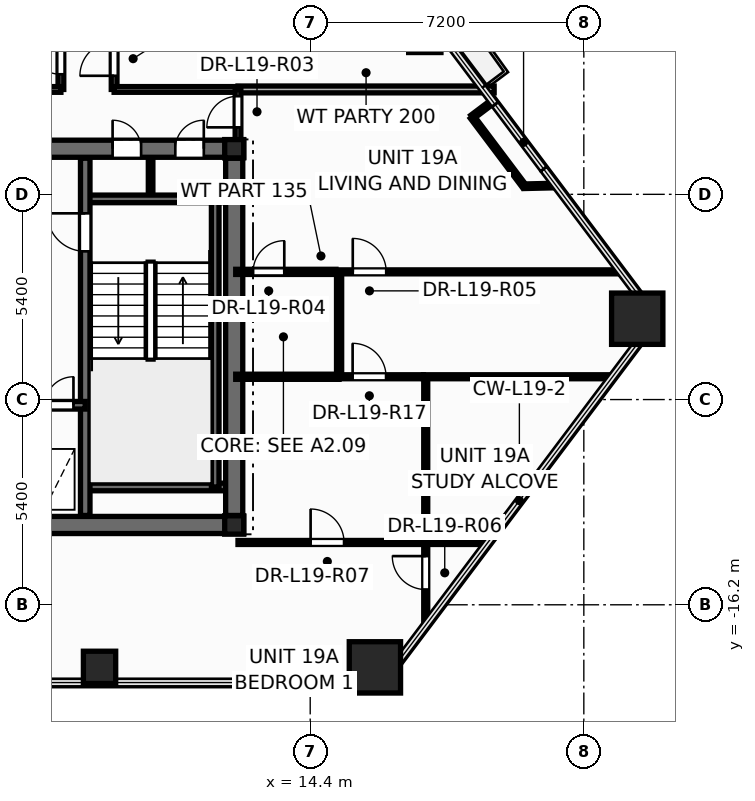
"""IFC4 building model, lengths in metres.
Left out: names, types, materials, properties, quantities, classifications, styles, units other than length and angle.
Written with IfcOpenShell. Run it as: python <this file> out.ifc"""

import sys

from ifc_helpers import new_model, si_unit, direction, frame, frame_2d, origin, origin_2d, place, context, subcontext, project, spatial, rectangle, hollow_rectangle, hollow_circle, i_section, extrude, element, fill, save


model = new_model("IFC4")
c1 = context("Model", 3, precision=1e-05, world=origin(), true_north=direction((0.0, 1.0)))
c2 = subcontext(c1, "Body", "Model", "MODEL_VIEW")
j1 = project(units=[si_unit("LENGTHUNIT", "METRE"), si_unit("PLANEANGLEUNIT", "RADIAN")], contexts=[c1])
p1 = place(None, origin())
s1 = spatial("IfcSite", under=j1, at=p1, CompositionType="ELEMENT")
p2 = place(p1, origin())
s2 = spatial("IfcBuilding", under=s1, at=p2, CompositionType="ELEMENT")
p3 = place(p2, frame((0.0, 0.0, 75.6)))
s3 = spatial("IfcBuildingStorey", under=s2, at=p3, CompositionType="ELEMENT", Elevation=75.6)
for number, where, z_axis, x_axis in (
    (1, (16.103, -17.847, 0.0), (0.0, 0.0, 1.0), (1.0, 0.0, 0.0)),
    (2, (23.005, -8.673, 0.0), (0.0, 0.0, 1.0), (1.0, 0.0, 0.0)),
):
    element("IfcColumn", number, at=place(p3, frame(where, z_axis=z_axis, x_axis=x_axis)), inside=s3, PredefinedType="COLUMN", context=c2, shape_type="SweptSolid", body=[
        extrude(hollow_rectangle(XDim=1.35, YDim=1.35, WallThickness=0.065, at=origin_2d()), origin(), (0.0, 0.0, 1.0), 3.6),
    ])
for number, where, z_axis, x_axis in (
    (3, (8.856, -17.847, 0.0), (0.0, 0.0, 1.0), (1.0, 0.0, 0.0)),
    (4, (17.416, -1.244, 0.0), (0.0, 0.0, 1.0), (1.0, 0.0, 0.0)),
):
    element("IfcColumn", number, at=place(p3, frame(where, z_axis=z_axis, x_axis=x_axis)), inside=s3, PredefinedType="COLUMN", context=c2, shape_type="SweptSolid", body=[
        extrude(hollow_circle(Radius=0.425, WallThickness=0.038, at=origin_2d()), origin(), (0.0, 0.0, 1.0), 3.6),
    ])
for number, where, z_axis, x_axis in (
    (5, (12.4, -14.1, 0.0), (0.0, 0.0, 1.0), (1.0, 0.0, 0.0)),
    (6, (12.4, -4.2, 0.0), (0.0, 0.0, 1.0), (1.0, 0.0, 0.0)),
):
    element("IfcColumn", number, at=place(p3, frame(where, z_axis=z_axis, x_axis=x_axis)), inside=s3, PredefinedType="COLUMN", context=c2, shape_type="SweptSolid", body=[
        extrude(i_section(OverallWidth=0.5, OverallDepth=0.482, WebThickness=0.04, FlangeThickness=0.045, at=origin_2d()), origin(), (0.0, 0.0, 1.0), 3.6),
    ])
p4 = place(p3, frame((10.2, -5.52, 0.0), z_axis=(0.0, 0.0, 1.0), x_axis=(0.0, 1.0, 0.0)))
e7 = element("IfcWall", 7, at=p4, inside=s3, PredefinedType="PARTITIONING", context=c2, shape_type="SweptSolid", body=[
    extrude(rectangle(XDim=1.12, YDim=0.12, at=frame_2d((0.56, 0.0))), origin(), (0.0, 0.0, 1.0), 3.35),
])
p5 = place(p3, frame((-12.65, -14.1, 0.0), z_axis=(0.0, 0.0, 1.0), x_axis=(1.0, 0.0, 0.0)))
e8 = element("IfcWall", 8, at=p5, inside=s3, PredefinedType="SHEAR", context=c2, shape_type="SweptSolid", body=[
    extrude(rectangle(XDim=25.3, YDim=0.45, at=frame_2d((12.65, 0.0))), origin(), (0.0, 0.0, 1.0), 3.6),
])
p6 = place(p3, frame((-12.65, -4.2, 0.0), z_axis=(0.0, 0.0, 1.0), x_axis=(1.0, 0.0, 0.0)))
e9 = element("IfcWall", 9, at=p6, inside=s3, PredefinedType="SHEAR", context=c2, shape_type="SweptSolid", body=[
    extrude(rectangle(XDim=25.3, YDim=0.45, at=frame_2d((12.65, 0.0))), origin(), (0.0, 0.0, 1.0), 3.6),
])
p7 = place(p6, frame((1.85, 0.0, 0.0)))
e10 = element("IfcOpeningElement", 10, at=p7, cuts=e9, PredefinedType="OPENING", context=c2, shape_type="SweptSolid", body=[
    extrude(rectangle(XDim=0.756, YDim=2.054, at=frame_2d((0.375, 1.027))), frame((0.0, 0.235, 0.0), z_axis=(0.0, -1.0, 0.0), x_axis=(1.0, 0.0, 0.0)), (0.0, 0.0, 1.0), 0.47),
])
p8 = place(p6, frame((21.85, 0.0, 0.0)))
e11 = element("IfcOpeningElement", 11, at=p8, cuts=e9, PredefinedType="OPENING", context=c2, shape_type="SweptSolid", body=[
    extrude(rectangle(XDim=0.756, YDim=2.054, at=frame_2d((0.375, 1.027))), frame((0.0, 0.235, 0.0), z_axis=(0.0, -1.0, 0.0), x_axis=(1.0, 0.0, 0.0)), (0.0, 0.0, 1.0), 0.47),
])
p9 = place(p6, frame((23.5, 0.0, 0.0)))
e12 = element("IfcOpeningElement", 12, at=p9, cuts=e9, PredefinedType="OPENING", context=c2, shape_type="SweptSolid", body=[
    extrude(rectangle(XDim=0.756, YDim=2.054, at=frame_2d((0.375, 1.027))), frame((0.0, 0.235, 0.0), z_axis=(0.0, -1.0, 0.0), x_axis=(1.0, 0.0, 0.0)), (0.0, 0.0, 1.0), 0.47),
])
p10 = place(p6, frame((5.85, 0.0, 0.0)))
e13 = element("IfcOpeningElement", 13, at=p10, cuts=e9, PredefinedType="OPENING", context=c2, shape_type="SweptSolid", body=[
    extrude(rectangle(XDim=1.006, YDim=2.104, at=frame_2d((0.5, 1.052))), frame((0.0, 0.235, 0.0), z_axis=(0.0, -1.0, 0.0), x_axis=(1.0, 0.0, 0.0)), (0.0, 0.0, 1.0), 0.47),
])
p11 = place(p6, frame((10.35, 0.0, 0.0)))
e14 = element("IfcOpeningElement", 14, at=p11, cuts=e9, PredefinedType="OPENING", context=c2, shape_type="SweptSolid", body=[
    extrude(rectangle(XDim=1.406, YDim=2.154, at=frame_2d((0.7, 1.077))), frame((0.0, 0.235, 0.0), z_axis=(0.0, -1.0, 0.0), x_axis=(1.0, 0.0, 0.0)), (0.0, 0.0, 1.0), 0.47),
])
p12 = place(p6, frame((18.45, 0.0, 0.0)))
e15 = element("IfcOpeningElement", 15, at=p12, cuts=e9, PredefinedType="OPENING", context=c2, shape_type="SweptSolid", body=[
    extrude(rectangle(XDim=1.006, YDim=2.104, at=frame_2d((0.5, 1.052))), frame((0.0, 0.235, 0.0), z_axis=(0.0, -1.0, 0.0), x_axis=(1.0, 0.0, 0.0)), (0.0, 0.0, 1.0), 0.47),
])
for number, where, z_axis, x_axis in (
    (16, (8.48, -5.52, 0.0), (0.0, 0.0, 1.0), (1.0, 0.0, 0.0)),
    (17, (8.48, -13.1, 0.0), (0.0, 0.0, 1.0), (1.0, 0.0, 0.0)),
):
    element("IfcWall", number, at=place(p3, frame(where, z_axis=z_axis, x_axis=x_axis)), inside=s3, PredefinedType="SOLIDWALL", context=c2, shape_type="SweptSolid", body=[
        extrude(rectangle(XDim=3.87, YDim=0.2, at=frame_2d((1.935, 0.0))), origin(), (0.0, 0.0, 1.0), 3.6),
    ])
p13 = place(p3, frame((11.9, -13.1, 0.0), z_axis=(0.0, 0.0, 1.0), x_axis=(0.0, 1.0, 0.0)))
e18 = element("IfcWall", 18, at=p13, inside=s3, PredefinedType="SOLIDWALL", context=c2, shape_type="SweptSolid", body=[
    extrude(rectangle(XDim=7.58, YDim=0.2, at=frame_2d((3.79, 0.0))), origin(), (0.0, 0.0, 1.0), 3.6),
])
p14 = place(p3, frame((8.48, -13.85, 0.0), z_axis=(0.0, 0.0, 1.0), x_axis=(0.0, 1.0, 0.0)))
e19 = element("IfcWall", 19, at=p14, inside=s3, PredefinedType="SHEAR", context=c2, shape_type="SweptSolid", body=[
    extrude(rectangle(XDim=9.4, YDim=0.25, at=frame_2d((4.7, 0.0))), origin(), (0.0, 0.0, 1.0), 3.6),
])
p15 = place(p14, frame((6.95, 0.0, 0.0)))
e20 = element("IfcOpeningElement", 20, at=p15, cuts=e19, PredefinedType="OPENING", context=c2, shape_type="SweptSolid", body=[
    extrude(rectangle(XDim=1.006, YDim=2.104, at=frame_2d((0.5, 1.052))), frame((0.0, 0.135, 0.0), z_axis=(0.0, -1.0, 0.0), x_axis=(1.0, 0.0, 0.0)), (0.0, 0.0, 1.0), 0.27),
])
p16 = place(p3, frame((5.12, -10.95, 0.0), z_axis=(0.0, 0.0, 1.0), x_axis=(1.0, 0.0, 0.0)))
e21 = element("IfcWall", 21, at=p16, inside=s3, PredefinedType="SOLIDWALL", context=c2, shape_type="SweptSolid", body=[
    extrude(rectangle(XDim=3.36, YDim=0.2, at=frame_2d((1.68, 0.0))), origin(), (0.0, 0.0, 1.0), 3.6),
])
p17 = place(p16, frame((0.42, 0.0, 0.0)))
e22 = element("IfcOpeningElement", 22, at=p17, cuts=e21, PredefinedType="OPENING", context=c2, shape_type="SweptSolid", body=[
    extrude(rectangle(XDim=1.106, YDim=2.104, at=frame_2d((0.55, 1.052))), frame((0.0, 0.11, 0.0), z_axis=(0.0, -1.0, 0.0), x_axis=(1.0, 0.0, 0.0)), (0.0, 0.0, 1.0), 0.22),
])
p18 = place(p16, frame((2.3, 0.0, 0.0)))
e23 = element("IfcOpeningElement", 23, at=p18, cuts=e21, PredefinedType="OPENING", context=c2, shape_type="SweptSolid", body=[
    extrude(rectangle(XDim=0.756, YDim=2.054, at=frame_2d((0.375, 1.027))), frame((0.0, 0.11, 0.0), z_axis=(0.0, -1.0, 0.0), x_axis=(1.0, 0.0, 0.0)), (0.0, 0.0, 1.0), 0.22),
])
p19 = place(p3, frame((12.4, -13.85, 0.0), z_axis=(0.0, 0.0, 1.0), x_axis=(0.0, 1.0, 0.0)))
e24 = element("IfcWall", 24, at=p19, inside=s3, PredefinedType="SHEAR", context=c2, shape_type="SweptSolid", body=[
    extrude(rectangle(XDim=9.4, YDim=0.45, at=frame_2d((4.7, 0.0))), origin(), (0.0, 0.0, 1.0), 3.6),
])
p20 = place(p3, frame((7.84, -2.64, 0.0), z_axis=(0.0, 0.0, 1.0), x_axis=(0.0, 1.0, 0.0)))
e25 = element("IfcWall", 25, at=p20, inside=s3, PredefinedType="PARTITIONING", context=c2, shape_type="SweptSolid", body=[
    extrude(rectangle(XDim=8.84, YDim=0.15, at=frame_2d((4.42, 0.0))), origin(), (0.0, 0.0, 1.0), 2.509),
])
p21 = place(p20, frame((0.399, 0.0, 0.0)))
e26 = element("IfcOpeningElement", 26, at=p21, cuts=e25, PredefinedType="OPENING", context=c2, shape_type="SweptSolid", body=[
    extrude(rectangle(XDim=0.906, YDim=2.104, at=frame_2d((0.45, 1.052))), frame((0.0, 0.085, 0.0), z_axis=(0.0, -1.0, 0.0), x_axis=(1.0, 0.0, 0.0)), (0.0, 0.0, 1.0), 0.17),
])
p22 = place(p3, frame((9.24, -2.64, 0.0), z_axis=(0.0, 0.0, 1.0), x_axis=(0.0, 1.0, 0.0)))
e27 = element("IfcWall", 27, at=p22, inside=s3, PredefinedType="PARTITIONING", context=c2, shape_type="SweptSolid", body=[
    extrude(rectangle(XDim=8.84, YDim=0.15, at=frame_2d((4.42, 0.0))), origin(), (0.0, 0.0, 1.0), 2.509),
])
p23 = place(p22, frame((0.359, 0.0, 0.0)))
e28 = element("IfcOpeningElement", 28, at=p23, cuts=e27, PredefinedType="OPENING", context=c2, shape_type="SweptSolid", body=[
    extrude(rectangle(XDim=0.906, YDim=2.104, at=frame_2d((0.45, 1.052))), frame((0.0, 0.085, 0.0), z_axis=(0.0, -1.0, 0.0), x_axis=(1.0, 0.0, 0.0)), (0.0, 0.0, 1.0), 0.17),
])
p24 = place(p3, frame((15.08, -7.44, 0.0), z_axis=(0.0, 0.0, 1.0), x_axis=(1.0, 0.0, 0.0)))
e29 = element("IfcWall", 29, at=p24, inside=s3, PredefinedType="PARTITIONING", context=c2, shape_type="SweptSolid", body=[
    extrude(rectangle(XDim=7.498, YDim=0.105, at=frame_2d((3.749, 0.0))), origin(), (0.0, 0.0, 1.0), 2.325),
])
p25 = place(p24, frame((0.44, 0.0, 0.0)))
e30 = element("IfcOpeningElement", 30, at=p25, cuts=e29, PredefinedType="OPENING", context=c2, shape_type="SweptSolid", body=[
    extrude(rectangle(XDim=0.886, YDim=2.104, at=frame_2d((0.44, 1.052))), frame((0.0, 0.062, 0.0), z_axis=(0.0, -1.0, 0.0), x_axis=(1.0, 0.0, 0.0)), (0.0, 0.0, 1.0), 0.125),
])
p26 = place(p3, frame((12.5, -2.64, 0.0), z_axis=(0.0, 0.0, 1.0), x_axis=(1.0, 0.0, 0.0)))
e31 = element("IfcWall", 31, at=p26, inside=s3, PredefinedType="PARTITIONING", context=c2, shape_type="SweptSolid", body=[
    extrude(rectangle(XDim=6.74, YDim=0.18, at=frame_2d((3.37, 0.0))), origin(), (0.0, 0.0, 1.0), 2.713),
])
p27 = place(p3, frame((12.5, -14.56, 0.0), z_axis=(0.0, 0.0, 1.0), x_axis=(1.0, 0.0, 0.0)))
e32 = element("IfcWall", 32, at=p27, inside=s3, PredefinedType="PARTITIONING", context=c2, shape_type="SweptSolid", body=[
    extrude(rectangle(XDim=6.576, YDim=0.105, at=frame_2d((3.288, 0.0))), origin(), (0.0, 0.0, 1.0), 2.713),
])
p28 = place(p27, frame((1.911, 0.0, 0.0)))
e33 = element("IfcOpeningElement", 33, at=p28, cuts=e32, PredefinedType="OPENING", context=c2, shape_type="SweptSolid", body=[
    extrude(rectangle(XDim=0.886, YDim=2.104, at=frame_2d((0.44, 1.052))), frame((0.0, 0.062, 0.0), z_axis=(0.0, -1.0, 0.0), x_axis=(1.0, 0.0, 0.0)), (0.0, 0.0, 1.0), 0.125),
])
p29 = place(p3, frame((17.44, -16.734, 0.0), z_axis=(0.0, 0.0, 1.0), x_axis=(0.0, 1.0, 0.0)))
e34 = element("IfcWall", 34, at=p29, inside=s3, PredefinedType="PARTITIONING", context=c2, shape_type="SweptSolid", body=[
    extrude(rectangle(XDim=6.534, YDim=0.105, at=frame_2d((3.267, 0.0))), origin(), (0.0, 0.0, 1.0), 2.713),
])
p30 = place(p29, frame((0.936, 0.0, 0.0)))
e35 = element("IfcOpeningElement", 35, at=p30, cuts=e34, PredefinedType="OPENING", context=c2, shape_type="SweptSolid", body=[
    extrude(rectangle(XDim=0.886, YDim=2.104, at=frame_2d((0.44, 1.052))), frame((0.0, 0.062, 0.0), z_axis=(0.0, -1.0, 0.0), x_axis=(1.0, 0.0, 0.0)), (0.0, 0.0, 1.0), 0.125),
])
p31 = place(p3, frame((1.662, -2.64, 0.0), z_axis=(0.0, 0.0, 1.0), x_axis=(1.0, 0.0, 0.0)))
e36 = element("IfcWall", 36, at=p31, inside=s3, PredefinedType="PARTITIONING", context=c2, shape_type="SweptSolid", body=[
    extrude(rectangle(XDim=6.178, YDim=0.15, at=frame_2d((3.089, 0.0))), origin(), (0.0, 0.0, 1.0), 2.325),
])
p32 = place(p3, frame((17.38, -10.2, 0.0), z_axis=(0.0, 0.0, 1.0), x_axis=(1.0, 0.0, 0.0)))
e37 = element("IfcWall", 37, at=p32, inside=s3, PredefinedType="PARTITIONING", context=c2, shape_type="SweptSolid", body=[
    extrude(rectangle(XDim=4.977, YDim=0.105, at=frame_2d((2.488, 0.0))), origin(), (0.0, 0.0, 1.0), 2.713),
])
p33 = place(p3, frame((9.24, -2.64, 0.0), z_axis=(0.0, 0.0, 1.0), x_axis=(1.0, 0.0, 0.0)))
e38 = element("IfcWall", 38, at=p33, inside=s3, PredefinedType="PARTITIONING", context=c2, shape_type="SweptSolid", body=[
    extrude(rectangle(XDim=3.26, YDim=0.15, at=frame_2d((1.63, 0.0))), origin(), (0.0, 0.0, 1.0), 3.35),
])
p34 = place(p3, frame((12.44, -7.44, 0.0), z_axis=(0.0, 0.0, 1.0), x_axis=(1.0, 0.0, 0.0)))
e39 = element("IfcWall", 39, at=p34, inside=s3, PredefinedType="PARTITIONING", context=c2, shape_type="SweptSolid", body=[
    extrude(rectangle(XDim=2.638, YDim=0.135, at=frame_2d((1.319, 0.0))), origin(), (0.0, 0.0, 1.0), 2.713),
])
p35 = place(p34, frame((0.458, 0.0, 0.0)))
e40 = element("IfcOpeningElement", 40, at=p35, cuts=e39, PredefinedType="OPENING", context=c2, shape_type="SweptSolid", body=[
    extrude(rectangle(XDim=0.826, YDim=2.104, at=frame_2d((0.41, 1.052))), frame((0.0, 0.078, 0.0), z_axis=(0.0, -1.0, 0.0), x_axis=(1.0, 0.0, 0.0)), (0.0, 0.0, 1.0), 0.155),
])
p36 = place(p3, frame((15.16, -10.2, 0.0), z_axis=(0.0, 0.0, 1.0), x_axis=(0.0, 1.0, 0.0)))
e41 = element("IfcWall", 41, at=p36, inside=s3, PredefinedType="PARTITIONING", context=c2, shape_type="SweptSolid", body=[
    extrude(rectangle(XDim=2.76, YDim=0.135, at=frame_2d((1.38, 0.0))), origin(), (0.0, 0.0, 1.0), 3.35),
])
p37 = place(p3, frame((12.44, -10.2, 0.0), z_axis=(0.0, 0.0, 1.0), x_axis=(1.0, 0.0, 0.0)))
e42 = element("IfcWall", 42, at=p37, inside=s3, PredefinedType="PARTITIONING", context=c2, shape_type="SweptSolid", body=[
    extrude(rectangle(XDim=2.72, YDim=0.135, at=frame_2d((1.36, 0.0))), origin(), (0.0, 0.0, 1.0), 2.713),
])
p38 = place(p3, frame((15.16, -10.2, 0.0), z_axis=(0.0, 0.0, 1.0), x_axis=(1.0, 0.0, 0.0)))
e43 = element("IfcWall", 43, at=p38, inside=s3, PredefinedType="PARTITIONING", context=c2, shape_type="SweptSolid", body=[
    extrude(rectangle(XDim=2.218, YDim=0.105, at=frame_2d((1.109, 0.0))), origin(), (0.0, 0.0, 1.0), 3.35),
])
p39 = place(p38, frame((0.356, 0.0, 0.0)))
e44 = element("IfcOpeningElement", 44, at=p39, cuts=e43, PredefinedType="OPENING", context=c2, shape_type="SweptSolid", body=[
    extrude(rectangle(XDim=0.886, YDim=2.104, at=frame_2d((0.44, 1.052))), frame((0.0, 0.062, 0.0), z_axis=(0.0, -1.0, 0.0), x_axis=(1.0, 0.0, 0.0)), (0.0, 0.0, 1.0), 0.125),
])
p40 = place(p3, frame((20.032, -5.187, 0.0), z_axis=(0.0, 0.0, 1.0), x_axis=(-0.601301632327, 0.799022119194, 0.0)))
e45 = element("IfcWall", 45, at=p40, inside=s3, PredefinedType="PARTITIONING", context=c2, shape_type="SweptSolid", body=[
    extrude(rectangle(XDim=2.279, YDim=0.12, at=frame_2d((1.14, 0.0))), origin(), (0.0, 0.0, 1.0), 3.35),
])
p41 = place(p3, frame((12.5, -4.24, 0.0), z_axis=(0.0, 0.0, 1.0), x_axis=(0.0, 1.0, 0.0)))
e46 = element("IfcWall", 46, at=p41, inside=s3, PredefinedType="PARTITIONING", context=c2, shape_type="SweptSolid", body=[
    extrude(rectangle(XDim=1.6, YDim=0.15, at=frame_2d((0.8, 0.0))), origin(), (0.0, 0.0, 1.0), 2.325),
])
p42 = place(p41, frame((0.602, 0.0, 0.0)))
e47 = element("IfcOpeningElement", 47, at=p42, cuts=e46, PredefinedType="OPENING", context=c2, shape_type="SweptSolid", body=[
    extrude(rectangle(XDim=0.826, YDim=2.104, at=frame_2d((0.41, 1.052))), frame((0.0, 0.085, 0.0), z_axis=(0.0, -1.0, 0.0), x_axis=(1.0, 0.0, 0.0)), (0.0, 0.0, 1.0), 0.17),
])
p43 = place(p3, frame((20.856, -5.168, 0.0), z_axis=(0.0, 0.0, 1.0), x_axis=(-0.999739997708, -0.022802126725, 0.0)))
e48 = element("IfcWall", 48, at=p43, inside=s3, PredefinedType="PARTITIONING", context=c2, shape_type="SweptSolid", body=[
    extrude(rectangle(XDim=0.824, YDim=0.12, at=frame_2d((0.412, 0.0))), origin(), (0.0, 0.0, 1.0), 2.713),
])
p44 = place(p3, frame((18.662, -3.366, 0.0), z_axis=(0.0, 0.0, 1.0), x_axis=(0.799080830747, 0.601223607265, 0.0)))
e49 = element("IfcWall", 49, at=p44, inside=s3, PredefinedType="PARTITIONING", context=c2, shape_type="SweptSolid", body=[
    extrude(rectangle(XDim=0.67, YDim=0.12, at=frame_2d((0.335, 0.0))), origin(), (0.0, 0.0, 1.0), 2.713),
])
p45 = place(p15, origin())
e50 = element("IfcDoor", 50, at=p45, inside=s3, OperationType="SINGLE_SWING_RIGHT", PredefinedType="DOOR", context=c2, shape_type="SweptSolid", body=[
    extrude(rectangle(XDim=1.0, YDim=2.1, at=frame_2d((0.5, 1.05))), frame((0.0, 0.025, 0.0), z_axis=(0.0, -1.0, 0.0), x_axis=(1.0, 0.0, 0.0)), (0.0, 0.0, 1.0), 0.05),
])
fill(e20, e50)
p46 = place(p18, origin())
e51 = element("IfcDoor", 51, at=p46, inside=s3, OperationType="SINGLE_SWING_RIGHT", PredefinedType="DOOR", context=c2, shape_type="SweptSolid", body=[
    extrude(rectangle(XDim=0.75, YDim=2.05, at=frame_2d((0.375, 1.025))), frame((0.0, 0.025, 0.0), z_axis=(0.0, -1.0, 0.0), x_axis=(1.0, 0.0, 0.0)), (0.0, 0.0, 1.0), 0.05),
])
fill(e23, e51)
p47 = place(p8, origin())
e52 = element("IfcDoor", 52, at=p47, inside=s3, OperationType="SINGLE_SWING_LEFT", PredefinedType="DOOR", context=c2, shape_type="SweptSolid", body=[
    extrude(rectangle(XDim=0.75, YDim=2.05, at=frame_2d((0.375, 1.025))), frame((0.0, 0.025, 0.0), z_axis=(0.0, -1.0, 0.0), x_axis=(1.0, 0.0, 0.0)), (0.0, 0.0, 1.0), 0.05),
])
fill(e11, e52)
p48 = place(p9, origin())
e53 = element("IfcDoor", 53, at=p48, inside=s3, OperationType="SINGLE_SWING_RIGHT", PredefinedType="DOOR", context=c2, shape_type="SweptSolid", body=[
    extrude(rectangle(XDim=0.75, YDim=2.05, at=frame_2d((0.375, 1.025))), frame((0.0, 0.025, 0.0), z_axis=(0.0, -1.0, 0.0), x_axis=(1.0, 0.0, 0.0)), (0.0, 0.0, 1.0), 0.05),
])
fill(e12, e53)
p49 = place(p42, origin())
e54 = element("IfcDoor", 54, at=p49, inside=s3, OperationType="SINGLE_SWING_LEFT", PredefinedType="DOOR", context=c2, shape_type="SweptSolid", body=[
    extrude(rectangle(XDim=0.82, YDim=2.1, at=frame_2d((0.41, 1.05))), frame((0.0, 0.025, 0.0), z_axis=(0.0, -1.0, 0.0), x_axis=(1.0, 0.0, 0.0)), (0.0, 0.0, 1.0), 0.05),
])
fill(e47, e54)
p50 = place(p35, origin())
e55 = element("IfcDoor", 55, at=p50, inside=s3, OperationType="SINGLE_SWING_RIGHT", PredefinedType="DOOR", context=c2, shape_type="SweptSolid", body=[
    extrude(rectangle(XDim=0.82, YDim=2.1, at=frame_2d((0.41, 1.05))), frame((0.0, 0.025, 0.0), z_axis=(0.0, -1.0, 0.0), x_axis=(1.0, 0.0, 0.0)), (0.0, 0.0, 1.0), 0.05),
])
fill(e40, e55)
p51 = place(p25, origin())
e56 = element("IfcDoor", 56, at=p51, inside=s3, OperationType="SINGLE_SWING_LEFT", PredefinedType="DOOR", context=c2, shape_type="SweptSolid", body=[
    extrude(rectangle(XDim=0.88, YDim=2.1, at=frame_2d((0.44, 1.05))), frame((0.0, 0.025, 0.0), z_axis=(0.0, -1.0, 0.0), x_axis=(1.0, 0.0, 0.0)), (0.0, 0.0, 1.0), 0.05),
])
fill(e30, e56)
p52 = place(p30, origin())
e57 = element("IfcDoor", 57, at=p52, inside=s3, OperationType="SINGLE_SWING_RIGHT", PredefinedType="DOOR", context=c2, shape_type="SweptSolid", body=[
    extrude(rectangle(XDim=0.88, YDim=2.1, at=frame_2d((0.44, 1.05))), frame((0.0, 0.025, 0.0), z_axis=(0.0, -1.0, 0.0), x_axis=(1.0, 0.0, 0.0)), (0.0, 0.0, 1.0), 0.05),
])
fill(e35, e57)
p53 = place(p28, origin())
e58 = element("IfcDoor", 58, at=p53, inside=s3, OperationType="SINGLE_SWING_LEFT", PredefinedType="DOOR", context=c2, shape_type="SweptSolid", body=[
    extrude(rectangle(XDim=0.88, YDim=2.1, at=frame_2d((0.44, 1.05))), frame((0.0, 0.025, 0.0), z_axis=(0.0, -1.0, 0.0), x_axis=(1.0, 0.0, 0.0)), (0.0, 0.0, 1.0), 0.05),
])
fill(e33, e58)
p54 = place(p21, origin())
e59 = element("IfcDoor", 59, at=p54, inside=s3, OperationType="SINGLE_SWING_RIGHT", PredefinedType="DOOR", context=c2, shape_type="SweptSolid", body=[
    extrude(rectangle(XDim=0.9, YDim=2.1, at=frame_2d((0.45, 1.05))), frame((0.0, 0.025, 0.0), z_axis=(0.0, -1.0, 0.0), x_axis=(1.0, 0.0, 0.0)), (0.0, 0.0, 1.0), 0.05),
])
fill(e26, e59)
p55 = place(p23, origin())
e60 = element("IfcDoor", 60, at=p55, inside=s3, OperationType="SINGLE_SWING_LEFT", PredefinedType="DOOR", context=c2, shape_type="SweptSolid", body=[
    extrude(rectangle(XDim=0.9, YDim=2.1, at=frame_2d((0.45, 1.05))), frame((0.0, 0.025, 0.0), z_axis=(0.0, -1.0, 0.0), x_axis=(1.0, 0.0, 0.0)), (0.0, 0.0, 1.0), 0.05),
])
fill(e28, e60)
p56 = place(p39, origin())
e61 = element("IfcDoor", 61, at=p56, inside=s3, OperationType="SINGLE_SWING_LEFT", PredefinedType="DOOR", context=c2, shape_type="SweptSolid", body=[
    extrude(rectangle(XDim=0.88, YDim=2.1, at=frame_2d((0.44, 1.05))), frame((0.0, 0.025, 0.0), z_axis=(0.0, -1.0, 0.0), x_axis=(1.0, 0.0, 0.0)), (0.0, 0.0, 1.0), 0.05),
])
fill(e44, e61)
save(model, sys.argv[1])
